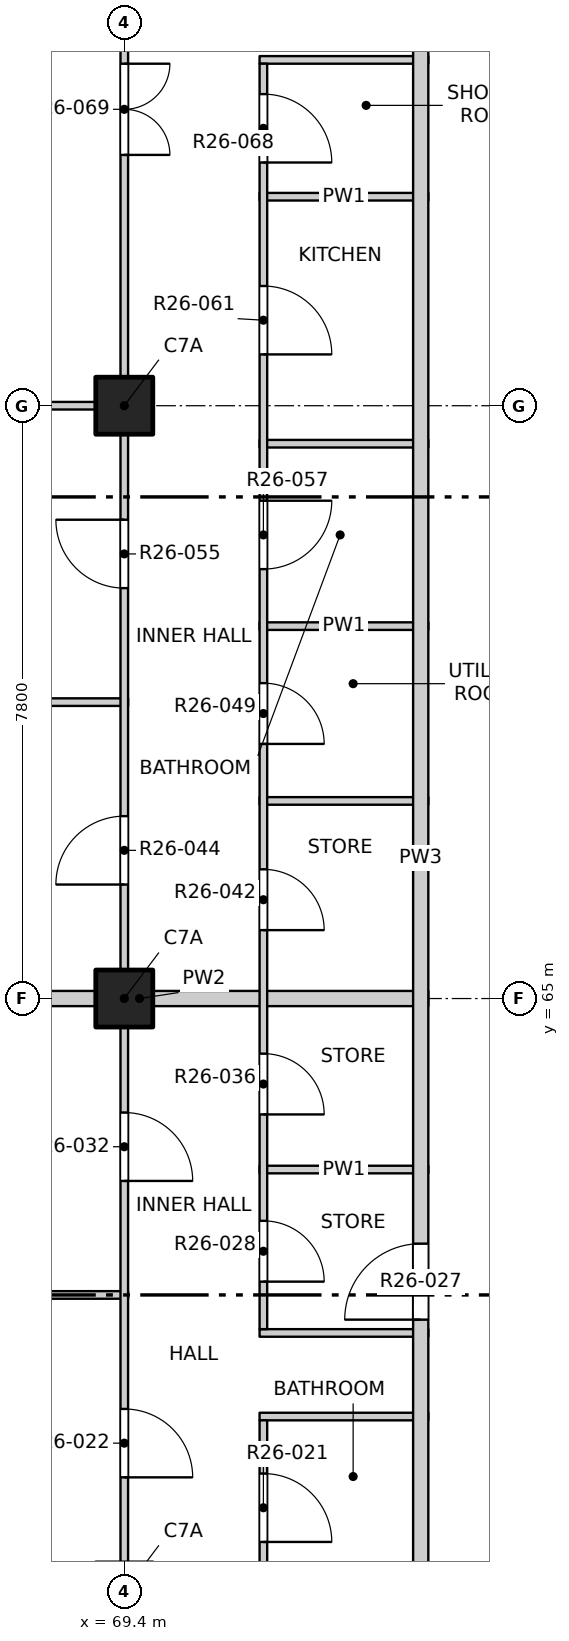
"""IFC4 building model, lengths in metres.
Left out: names, types, materials, properties, quantities, classifications, styles, units other than length and angle.
Written with IfcOpenShell. Run it as: python <this file> out.ifc"""

import sys

from ifc_helpers import new_model, si_unit, direction, frame, frame_2d, origin, origin_2d, place, context, subcontext, project, spatial, rectangle, extrude, element, fill, save


model = new_model("IFC4")
c1 = context("Model", 3, precision=1e-05, world=origin(), true_north=direction((0.0, 1.0)))
c2 = subcontext(c1, "Body", "Model", "MODEL_VIEW")
j1 = project(units=[si_unit("LENGTHUNIT", "METRE"), si_unit("PLANEANGLEUNIT", "RADIAN")], contexts=[c1])
p1 = place(None, origin())
s1 = spatial("IfcSite", under=j1, at=p1, CompositionType="ELEMENT")
p2 = place(p1, origin())
s2 = spatial("IfcBuilding", under=s1, at=p2, CompositionType="ELEMENT")
p3 = place(p2, frame((0.0, 0.0, 259.6)))
s3 = spatial("IfcBuildingStorey", under=s2, at=p3, CompositionType="ELEMENT", Elevation=259.6)
for number, where, z_axis, x_axis in (
    (1, (69.4, 65.0, -0.25), (0.0, 0.0, 1.0), (1.0, 0.0, 0.0)),
    (2, (69.4, 72.8, -0.25), (0.0, 0.0, 1.0), (1.0, 0.0, 0.0)),
):
    element("IfcColumn", number, at=place(p3, frame(where, z_axis=z_axis, x_axis=x_axis)), inside=s3, PredefinedType="COLUMN", context=c2, shape_type="SweptSolid", body=[
        extrude(rectangle(XDim=0.75, YDim=0.75, at=origin_2d()), origin(), (0.0, 0.0, 1.0), 3.4),
    ])
for number, where, z_axis, x_axis in (
    (3, (71.18, 59.5, 0.0), (0.0, 0.0, 1.0), (1.0, 0.0, 0.0)),
    (4, (71.18, 60.6, 0.0), (0.0, 0.0, 1.0), (1.0, 0.0, 0.0)),
):
    element("IfcWall", number, at=place(p3, frame(where, z_axis=z_axis, x_axis=x_axis)), inside=s3, PredefinedType="PARTITIONING", context=c2, shape_type="SweptSolid", body=[
        extrude(rectangle(XDim=2.22, YDim=0.1, at=frame_2d((1.11, 0.0))), origin(), (0.0, 0.0, 1.0), 3.15),
    ])
p4 = place(p3, frame((65.8, 61.1, 0.0), z_axis=(0.0, 0.0, 1.0), x_axis=(1.0, 0.0, 0.0)))
e5 = element("IfcWall", 5, at=p4, inside=s3, PredefinedType="PARTITIONING", context=c2, shape_type="SweptSolid", body=[
    extrude(rectangle(XDim=3.65, YDim=0.1, at=frame_2d((1.825, 0.0))), origin(), (0.0, 0.0, 1.0), 3.15),
])
p5 = place(p3, frame((71.18, 62.75, 0.0), z_axis=(0.0, 0.0, 1.0), x_axis=(1.0, 0.0, 0.0)))
e6 = element("IfcWall", 6, at=p5, inside=s3, PredefinedType="PARTITIONING", context=c2, shape_type="SweptSolid", body=[
    extrude(rectangle(XDim=2.22, YDim=0.1, at=frame_2d((1.11, 0.0))), origin(), (0.0, 0.0, 1.0), 3.15),
])
p6 = place(p3, frame((65.8, 65.0, 0.0), z_axis=(0.0, 0.0, 1.0), x_axis=(1.0, 0.0, 0.0)))
e7 = element("IfcWall", 7, at=p6, inside=s3, PredefinedType="PARTITIONING", context=c2, shape_type="SweptSolid", body=[
    extrude(rectangle(XDim=7.6, YDim=0.2, at=frame_2d((3.8, 0.0))), origin(), (0.0, 0.0, 1.0), 3.15),
])
p7 = place(p3, frame((71.18, 67.6, 0.0), z_axis=(0.0, 0.0, 1.0), x_axis=(1.0, 0.0, 0.0)))
e8 = element("IfcWall", 8, at=p7, inside=s3, PredefinedType="PARTITIONING", context=c2, shape_type="SweptSolid", body=[
    extrude(rectangle(XDim=2.22, YDim=0.1, at=frame_2d((1.11, 0.0))), origin(), (0.0, 0.0, 1.0), 3.15),
])
p8 = place(p3, frame((65.8, 68.9, 0.0), z_axis=(0.0, 0.0, 1.0), x_axis=(1.0, 0.0, 0.0)))
e9 = element("IfcWall", 9, at=p8, inside=s3, PredefinedType="PARTITIONING", context=c2, shape_type="SweptSolid", body=[
    extrude(rectangle(XDim=3.65, YDim=0.1, at=frame_2d((1.825, 0.0))), origin(), (0.0, 0.0, 1.0), 3.15),
])
for number, where, z_axis, x_axis in (
    (10, (71.18, 69.9, 0.0), (0.0, 0.0, 1.0), (1.0, 0.0, 0.0)),
    (11, (71.18, 72.3, 0.0), (0.0, 0.0, 1.0), (1.0, 0.0, 0.0)),
):
    element("IfcWall", number, at=place(p3, frame(where, z_axis=z_axis, x_axis=x_axis)), inside=s3, PredefinedType="PARTITIONING", context=c2, shape_type="SweptSolid", body=[
        extrude(rectangle(XDim=2.22, YDim=0.1, at=frame_2d((1.11, 0.0))), origin(), (0.0, 0.0, 1.0), 3.15),
    ])
p9 = place(p3, frame((65.8, 72.8, 0.0), z_axis=(0.0, 0.0, 1.0), x_axis=(1.0, 0.0, 0.0)))
e12 = element("IfcWall", 12, at=p9, inside=s3, PredefinedType="PARTITIONING", context=c2, shape_type="SweptSolid", body=[
    extrude(rectangle(XDim=3.65, YDim=0.1, at=frame_2d((1.825, 0.0))), origin(), (0.0, 0.0, 1.0), 3.15),
])
for number, where, z_axis, x_axis in (
    (13, (71.18, 75.55, 0.0), (0.0, 0.0, 1.0), (1.0, 0.0, 0.0)),
    (14, (71.18, 77.35, 0.0), (0.0, 0.0, 1.0), (1.0, 0.0, 0.0)),
):
    element("IfcWall", number, at=place(p3, frame(where, z_axis=z_axis, x_axis=x_axis)), inside=s3, PredefinedType="PARTITIONING", context=c2, shape_type="SweptSolid", body=[
        extrude(rectangle(XDim=2.22, YDim=0.1, at=frame_2d((1.11, 0.0))), origin(), (0.0, 0.0, 1.0), 3.15),
    ])
p10 = place(p3, frame((69.4, 45.8, 0.0), z_axis=(0.0, 0.0, 1.0), x_axis=(0.0, 1.0, 0.0)))
e15 = element("IfcWall", 15, at=p10, inside=s3, PredefinedType="PARTITIONING", context=c2, shape_type="SweptSolid", body=[
    extrude(rectangle(XDim=38.4, YDim=0.1, at=frame_2d((19.2, 0.0))), origin(), (0.0, 0.0, 1.0), 3.15),
])
p11 = place(p10, frame((1.05, 0.0, 0.0)))
e16 = element("IfcOpeningElement", 16, at=p11, cuts=e15, PredefinedType="OPENING", context=c2, shape_type="SweptSolid", body=[
    extrude(rectangle(XDim=1.2, YDim=2.1, at=frame_2d((0.6, 1.05))), frame((0.0, 0.06, 0.0), z_axis=(0.0, -1.0, 0.0), x_axis=(1.0, 0.0, 0.0)), (0.0, 0.0, 1.0), 0.12),
])
p12 = place(p10, frame((5.1, 0.0, 0.0)))
e17 = element("IfcOpeningElement", 17, at=p12, cuts=e15, PredefinedType="OPENING", context=c2, shape_type="SweptSolid", body=[
    extrude(rectangle(XDim=0.9, YDim=2.1, at=frame_2d((0.45, 1.05))), frame((0.0, 0.06, 0.0), z_axis=(0.0, -1.0, 0.0), x_axis=(1.0, 0.0, 0.0)), (0.0, 0.0, 1.0), 0.12),
])
p13 = place(p10, frame((9.0, 0.0, 0.0)))
e18 = element("IfcOpeningElement", 18, at=p13, cuts=e15, PredefinedType="OPENING", context=c2, shape_type="SweptSolid", body=[
    extrude(rectangle(XDim=0.9, YDim=2.1, at=frame_2d((0.45, 1.05))), frame((0.0, 0.06, 0.0), z_axis=(0.0, -1.0, 0.0), x_axis=(1.0, 0.0, 0.0)), (0.0, 0.0, 1.0), 0.12),
])
p14 = place(p10, frame((12.9, 0.0, 0.0)))
e19 = element("IfcOpeningElement", 19, at=p14, cuts=e15, PredefinedType="OPENING", context=c2, shape_type="SweptSolid", body=[
    extrude(rectangle(XDim=0.9, YDim=2.1, at=frame_2d((0.45, 1.05))), frame((0.0, 0.06, 0.0), z_axis=(0.0, -1.0, 0.0), x_axis=(1.0, 0.0, 0.0)), (0.0, 0.0, 1.0), 0.12),
])
p15 = place(p10, frame((16.8, 0.0, 0.0)))
e20 = element("IfcOpeningElement", 20, at=p15, cuts=e15, PredefinedType="OPENING", context=c2, shape_type="SweptSolid", body=[
    extrude(rectangle(XDim=0.9, YDim=2.1, at=frame_2d((0.45, 1.05))), frame((0.0, 0.06, 0.0), z_axis=(0.0, -1.0, 0.0), x_axis=(1.0, 0.0, 0.0)), (0.0, 0.0, 1.0), 0.12),
])
p16 = place(p10, frame((20.7, 0.0, 0.0)))
e21 = element("IfcOpeningElement", 21, at=p16, cuts=e15, PredefinedType="OPENING", context=c2, shape_type="SweptSolid", body=[
    extrude(rectangle(XDim=0.9, YDim=2.1, at=frame_2d((0.45, 1.05))), frame((0.0, 0.06, 0.0), z_axis=(0.0, -1.0, 0.0), x_axis=(1.0, 0.0, 0.0)), (0.0, 0.0, 1.0), 0.12),
])
p17 = place(p10, frame((24.6, 0.0, 0.0)))
e22 = element("IfcOpeningElement", 22, at=p17, cuts=e15, PredefinedType="OPENING", context=c2, shape_type="SweptSolid", body=[
    extrude(rectangle(XDim=0.9, YDim=2.1, at=frame_2d((0.45, 1.05))), frame((0.0, 0.06, 0.0), z_axis=(0.0, -1.0, 0.0), x_axis=(1.0, 0.0, 0.0)), (0.0, 0.0, 1.0), 0.12),
])
p18 = place(p10, frame((30.3, 0.0, 0.0)))
e23 = element("IfcOpeningElement", 23, at=p18, cuts=e15, PredefinedType="OPENING", context=c2, shape_type="SweptSolid", body=[
    extrude(rectangle(XDim=1.2, YDim=2.1, at=frame_2d((0.6, 1.05))), frame((0.0, 0.06, 0.0), z_axis=(0.0, -1.0, 0.0), x_axis=(1.0, 0.0, 0.0)), (0.0, 0.0, 1.0), 0.12),
])
p19 = place(p10, frame((36.15, 0.0, 0.0)))
e24 = element("IfcOpeningElement", 24, at=p19, cuts=e15, PredefinedType="OPENING", context=c2, shape_type="SweptSolid", body=[
    extrude(rectangle(XDim=1.2, YDim=2.1, at=frame_2d((0.6, 1.05))), frame((0.0, 0.06, 0.0), z_axis=(0.0, -1.0, 0.0), x_axis=(1.0, 0.0, 0.0)), (0.0, 0.0, 1.0), 0.12),
])
p20 = place(p3, frame((71.23, 49.45, 0.0), z_axis=(0.0, 0.0, 1.0), x_axis=(0.0, 1.0, 0.0)))
e25 = element("IfcWall", 25, at=p20, inside=s3, PredefinedType="PARTITIONING", context=c2, shape_type="SweptSolid", body=[
    extrude(rectangle(XDim=10.0, YDim=0.1, at=frame_2d((5.0, 0.0))), origin(), (0.0, 0.0, 1.0), 3.15),
])
p21 = place(p20, frame((0.7, 0.0, 0.0)))
e26 = element("IfcOpeningElement", 26, at=p21, cuts=e25, PredefinedType="OPENING", context=c2, shape_type="SweptSolid", body=[
    extrude(rectangle(XDim=0.8, YDim=2.1, at=frame_2d((0.4, 1.05))), frame((0.0, 0.06, 0.0), z_axis=(0.0, -1.0, 0.0), x_axis=(1.0, 0.0, 0.0)), (0.0, 0.0, 1.0), 0.12),
])
p22 = place(p20, frame((3.6, 0.0, 0.0)))
e27 = element("IfcOpeningElement", 27, at=p22, cuts=e25, PredefinedType="OPENING", context=c2, shape_type="SweptSolid", body=[
    extrude(rectangle(XDim=0.9, YDim=2.1, at=frame_2d((0.45, 1.05))), frame((0.0, 0.06, 0.0), z_axis=(0.0, -1.0, 0.0), x_axis=(1.0, 0.0, 0.0)), (0.0, 0.0, 1.0), 0.12),
])
p23 = place(p20, frame((6.3, 0.0, 0.0)))
e28 = element("IfcOpeningElement", 28, at=p23, cuts=e25, PredefinedType="OPENING", context=c2, shape_type="SweptSolid", body=[
    extrude(rectangle(XDim=0.9, YDim=2.1, at=frame_2d((0.45, 1.05))), frame((0.0, 0.06, 0.0), z_axis=(0.0, -1.0, 0.0), x_axis=(1.0, 0.0, 0.0)), (0.0, 0.0, 1.0), 0.12),
])
p24 = place(p20, frame((8.4, 0.0, 0.0)))
e29 = element("IfcOpeningElement", 29, at=p24, cuts=e25, PredefinedType="OPENING", context=c2, shape_type="SweptSolid", body=[
    extrude(rectangle(XDim=0.9, YDim=2.1, at=frame_2d((0.45, 1.05))), frame((0.0, 0.06, 0.0), z_axis=(0.0, -1.0, 0.0), x_axis=(1.0, 0.0, 0.0)), (0.0, 0.0, 1.0), 0.12),
])
p25 = place(p3, frame((71.23, 60.65, 0.0), z_axis=(0.0, 0.0, 1.0), x_axis=(0.0, 1.0, 0.0)))
e30 = element("IfcWall", 30, at=p25, inside=s3, PredefinedType="PARTITIONING", context=c2, shape_type="SweptSolid", body=[
    extrude(rectangle(XDim=16.65, YDim=0.1, at=frame_2d((8.325, 0.0))), origin(), (0.0, 0.0, 1.0), 3.15),
])
p26 = place(p25, frame((0.625, 0.0, 0.0)))
e31 = element("IfcOpeningElement", 31, at=p26, cuts=e30, PredefinedType="OPENING", context=c2, shape_type="SweptSolid", body=[
    extrude(rectangle(XDim=0.8, YDim=2.1, at=frame_2d((0.4, 1.05))), frame((0.0, 0.06, 0.0), z_axis=(0.0, -1.0, 0.0), x_axis=(1.0, 0.0, 0.0)), (0.0, 0.0, 1.0), 0.12),
])
p27 = place(p25, frame((2.825, 0.0, 0.0)))
e32 = element("IfcOpeningElement", 32, at=p27, cuts=e30, PredefinedType="OPENING", context=c2, shape_type="SweptSolid", body=[
    extrude(rectangle(XDim=0.8, YDim=2.1, at=frame_2d((0.4, 1.05))), frame((0.0, 0.06, 0.0), z_axis=(0.0, -1.0, 0.0), x_axis=(1.0, 0.0, 0.0)), (0.0, 0.0, 1.0), 0.12),
])
p28 = place(p25, frame((5.25, 0.0, 0.0)))
e33 = element("IfcOpeningElement", 33, at=p28, cuts=e30, PredefinedType="OPENING", context=c2, shape_type="SweptSolid", body=[
    extrude(rectangle(XDim=0.8, YDim=2.1, at=frame_2d((0.4, 1.05))), frame((0.0, 0.06, 0.0), z_axis=(0.0, -1.0, 0.0), x_axis=(1.0, 0.0, 0.0)), (0.0, 0.0, 1.0), 0.12),
])
p29 = place(p25, frame((7.7, 0.0, 0.0)))
e34 = element("IfcOpeningElement", 34, at=p29, cuts=e30, PredefinedType="OPENING", context=c2, shape_type="SweptSolid", body=[
    extrude(rectangle(XDim=0.8, YDim=2.1, at=frame_2d((0.4, 1.05))), frame((0.0, 0.06, 0.0), z_axis=(0.0, -1.0, 0.0), x_axis=(1.0, 0.0, 0.0)), (0.0, 0.0, 1.0), 0.12),
])
p30 = place(p25, frame((10.0, 0.0, 0.0)))
e35 = element("IfcOpeningElement", 35, at=p30, cuts=e30, PredefinedType="OPENING", context=c2, shape_type="SweptSolid", body=[
    extrude(rectangle(XDim=0.9, YDim=2.1, at=frame_2d((0.45, 1.05))), frame((0.0, 0.06, 0.0), z_axis=(0.0, -1.0, 0.0), x_axis=(1.0, 0.0, 0.0)), (0.0, 0.0, 1.0), 0.12),
])
p31 = place(p25, frame((12.825, 0.0, 0.0)))
e36 = element("IfcOpeningElement", 36, at=p31, cuts=e30, PredefinedType="OPENING", context=c2, shape_type="SweptSolid", body=[
    extrude(rectangle(XDim=0.9, YDim=2.1, at=frame_2d((0.45, 1.05))), frame((0.0, 0.06, 0.0), z_axis=(0.0, -1.0, 0.0), x_axis=(1.0, 0.0, 0.0)), (0.0, 0.0, 1.0), 0.12),
])
p32 = place(p25, frame((15.35, 0.0, 0.0)))
e37 = element("IfcOpeningElement", 37, at=p32, cuts=e30, PredefinedType="OPENING", context=c2, shape_type="SweptSolid", body=[
    extrude(rectangle(XDim=0.9, YDim=2.1, at=frame_2d((0.45, 1.05))), frame((0.0, 0.06, 0.0), z_axis=(0.0, -1.0, 0.0), x_axis=(1.0, 0.0, 0.0)), (0.0, 0.0, 1.0), 0.12),
])
p33 = place(p3, frame((73.3, 49.5, 0.0), z_axis=(0.0, 0.0, 1.0), x_axis=(0.0, 1.0, 0.0)))
e38 = element("IfcWall", 38, at=p33, inside=s3, PredefinedType="PARTITIONING", context=c2, shape_type="SweptSolid", body=[
    extrude(rectangle(XDim=34.7, YDim=0.2, at=frame_2d((17.35, 0.0))), origin(), (0.0, 0.0, 1.0), 3.15),
])
p34 = place(p33, frame((11.275, 0.0, 0.0)))
e39 = element("IfcOpeningElement", 39, at=p34, cuts=e38, PredefinedType="OPENING", context=c2, shape_type="SweptSolid", body=[
    extrude(rectangle(XDim=1.0, YDim=2.1, at=frame_2d((0.5, 1.05))), frame((0.0, 0.11, 0.0), z_axis=(0.0, -1.0, 0.0), x_axis=(1.0, 0.0, 0.0)), (0.0, 0.0, 1.0), 0.22),
])
p35 = place(p33, frame((29.125, 0.0, 0.0)))
e40 = element("IfcOpeningElement", 40, at=p35, cuts=e38, PredefinedType="OPENING", context=c2, shape_type="SweptSolid", body=[
    extrude(rectangle(XDim=1.0, YDim=2.1, at=frame_2d((0.5, 1.05))), frame((0.0, 0.11, 0.0), z_axis=(0.0, -1.0, 0.0), x_axis=(1.0, 0.0, 0.0)), (0.0, 0.0, 1.0), 0.22),
])
p36 = place(p24, origin())
e41 = element("IfcDoor", 41, at=p36, inside=s3, OperationType="SINGLE_SWING_RIGHT", PredefinedType="DOOR", context=c2, shape_type="SweptSolid", body=[
    extrude(rectangle(XDim=0.9, YDim=2.1, at=frame_2d((0.45, 1.05))), frame((0.0, 0.025, 0.0), z_axis=(0.0, -1.0, 0.0), x_axis=(1.0, 0.0, 0.0)), (0.0, 0.0, 1.0), 0.05),
])
fill(e29, e41)
p37 = place(p14, origin())
e42 = element("IfcDoor", 42, at=p37, inside=s3, OperationType="SINGLE_SWING_RIGHT", PredefinedType="DOOR", context=c2, shape_type="SweptSolid", body=[
    extrude(rectangle(XDim=0.9, YDim=2.1, at=frame_2d((0.45, 1.05))), frame((0.0, 0.025, 0.0), z_axis=(0.0, -1.0, 0.0), x_axis=(1.0, 0.0, 0.0)), (0.0, 0.0, 1.0), 0.05),
])
fill(e19, e42)
p38 = place(p34, origin())
e43 = element("IfcDoor", 43, at=p38, inside=s3, OperationType="SINGLE_SWING_RIGHT", PredefinedType="DOOR", context=c2, shape_type="SweptSolid", body=[
    extrude(rectangle(XDim=1.0, YDim=2.1, at=frame_2d((0.5, 1.05))), frame((0.0, 0.025, 0.0), z_axis=(0.0, -1.0, 0.0), x_axis=(1.0, 0.0, 0.0)), (0.0, 0.0, 1.0), 0.05),
])
fill(e39, e43)
p39 = place(p26, origin())
e44 = element("IfcDoor", 44, at=p39, inside=s3, OperationType="SINGLE_SWING_RIGHT", PredefinedType="DOOR", context=c2, shape_type="SweptSolid", body=[
    extrude(rectangle(XDim=0.8, YDim=2.1, at=frame_2d((0.4, 1.05))), frame((0.0, 0.025, 0.0), z_axis=(0.0, -1.0, 0.0), x_axis=(1.0, 0.0, 0.0)), (0.0, 0.0, 1.0), 0.05),
])
fill(e31, e44)
p40 = place(p15, origin())
e45 = element("IfcDoor", 45, at=p40, inside=s3, OperationType="SINGLE_SWING_RIGHT", PredefinedType="DOOR", context=c2, shape_type="SweptSolid", body=[
    extrude(rectangle(XDim=0.9, YDim=2.1, at=frame_2d((0.45, 1.05))), frame((0.0, 0.025, 0.0), z_axis=(0.0, -1.0, 0.0), x_axis=(1.0, 0.0, 0.0)), (0.0, 0.0, 1.0), 0.05),
])
fill(e20, e45)
p41 = place(p27, origin())
e46 = element("IfcDoor", 46, at=p41, inside=s3, OperationType="SINGLE_SWING_RIGHT", PredefinedType="DOOR", context=c2, shape_type="SweptSolid", body=[
    extrude(rectangle(XDim=0.8, YDim=2.1, at=frame_2d((0.4, 1.05))), frame((0.0, 0.025, 0.0), z_axis=(0.0, -1.0, 0.0), x_axis=(1.0, 0.0, 0.0)), (0.0, 0.0, 1.0), 0.05),
])
fill(e32, e46)
p42 = place(p28, origin())
e47 = element("IfcDoor", 47, at=p42, inside=s3, OperationType="SINGLE_SWING_RIGHT", PredefinedType="DOOR", context=c2, shape_type="SweptSolid", body=[
    extrude(rectangle(XDim=0.8, YDim=2.1, at=frame_2d((0.4, 1.05))), frame((0.0, 0.025, 0.0), z_axis=(0.0, -1.0, 0.0), x_axis=(1.0, 0.0, 0.0)), (0.0, 0.0, 1.0), 0.05),
])
fill(e33, e47)
p43 = place(p16, origin())
e48 = element("IfcDoor", 48, at=p43, inside=s3, OperationType="SINGLE_SWING_LEFT", PredefinedType="DOOR", context=c2, shape_type="SweptSolid", body=[
    extrude(rectangle(XDim=0.9, YDim=2.1, at=frame_2d((0.45, 1.05))), frame((0.0, 0.025, 0.0), z_axis=(0.0, -1.0, 0.0), x_axis=(1.0, 0.0, 0.0)), (0.0, 0.0, 1.0), 0.05),
])
fill(e21, e48)
p44 = place(p29, origin())
e49 = element("IfcDoor", 49, at=p44, inside=s3, OperationType="SINGLE_SWING_RIGHT", PredefinedType="DOOR", context=c2, shape_type="SweptSolid", body=[
    extrude(rectangle(XDim=0.8, YDim=2.1, at=frame_2d((0.4, 1.05))), frame((0.0, 0.025, 0.0), z_axis=(0.0, -1.0, 0.0), x_axis=(1.0, 0.0, 0.0)), (0.0, 0.0, 1.0), 0.05),
])
fill(e34, e49)
p45 = place(p17, origin())
e50 = element("IfcDoor", 50, at=p45, inside=s3, OperationType="SINGLE_SWING_RIGHT", PredefinedType="DOOR", context=c2, shape_type="SweptSolid", body=[
    extrude(rectangle(XDim=0.9, YDim=2.1, at=frame_2d((0.45, 1.05))), frame((0.0, 0.025, 0.0), z_axis=(0.0, -1.0, 0.0), x_axis=(1.0, 0.0, 0.0)), (0.0, 0.0, 1.0), 0.05),
])
fill(e22, e50)
p46 = place(p30, origin())
e51 = element("IfcDoor", 51, at=p46, inside=s3, OperationType="SINGLE_SWING_LEFT", PredefinedType="DOOR", context=c2, shape_type="SweptSolid", body=[
    extrude(rectangle(XDim=0.9, YDim=2.1, at=frame_2d((0.45, 1.05))), frame((0.0, 0.025, 0.0), z_axis=(0.0, -1.0, 0.0), x_axis=(1.0, 0.0, 0.0)), (0.0, 0.0, 1.0), 0.05),
])
fill(e35, e51)
p47 = place(p31, origin())
e52 = element("IfcDoor", 52, at=p47, inside=s3, OperationType="SINGLE_SWING_RIGHT", PredefinedType="DOOR", context=c2, shape_type="SweptSolid", body=[
    extrude(rectangle(XDim=0.9, YDim=2.1, at=frame_2d((0.45, 1.05))), frame((0.0, 0.025, 0.0), z_axis=(0.0, -1.0, 0.0), x_axis=(1.0, 0.0, 0.0)), (0.0, 0.0, 1.0), 0.05),
])
fill(e36, e52)
p48 = place(p32, origin())
e53 = element("IfcDoor", 53, at=p48, inside=s3, OperationType="SINGLE_SWING_RIGHT", PredefinedType="DOOR", context=c2, shape_type="SweptSolid", body=[
    extrude(rectangle(XDim=0.9, YDim=2.1, at=frame_2d((0.45, 1.05))), frame((0.0, 0.025, 0.0), z_axis=(0.0, -1.0, 0.0), x_axis=(1.0, 0.0, 0.0)), (0.0, 0.0, 1.0), 0.05),
])
fill(e37, e53)
p49 = place(p18, origin())
e54 = element("IfcDoor", 54, at=p49, inside=s3, OperationType="DOUBLE_DOOR_SINGLE_SWING", PredefinedType="DOOR", context=c2, shape_type="SweptSolid", body=[
    extrude(rectangle(XDim=1.2, YDim=2.1, at=frame_2d((0.6, 1.05))), frame((0.0, 0.025, 0.0), z_axis=(0.0, -1.0, 0.0), x_axis=(1.0, 0.0, 0.0)), (0.0, 0.0, 1.0), 0.05),
])
fill(e23, e54)
save(model, sys.argv[1])
